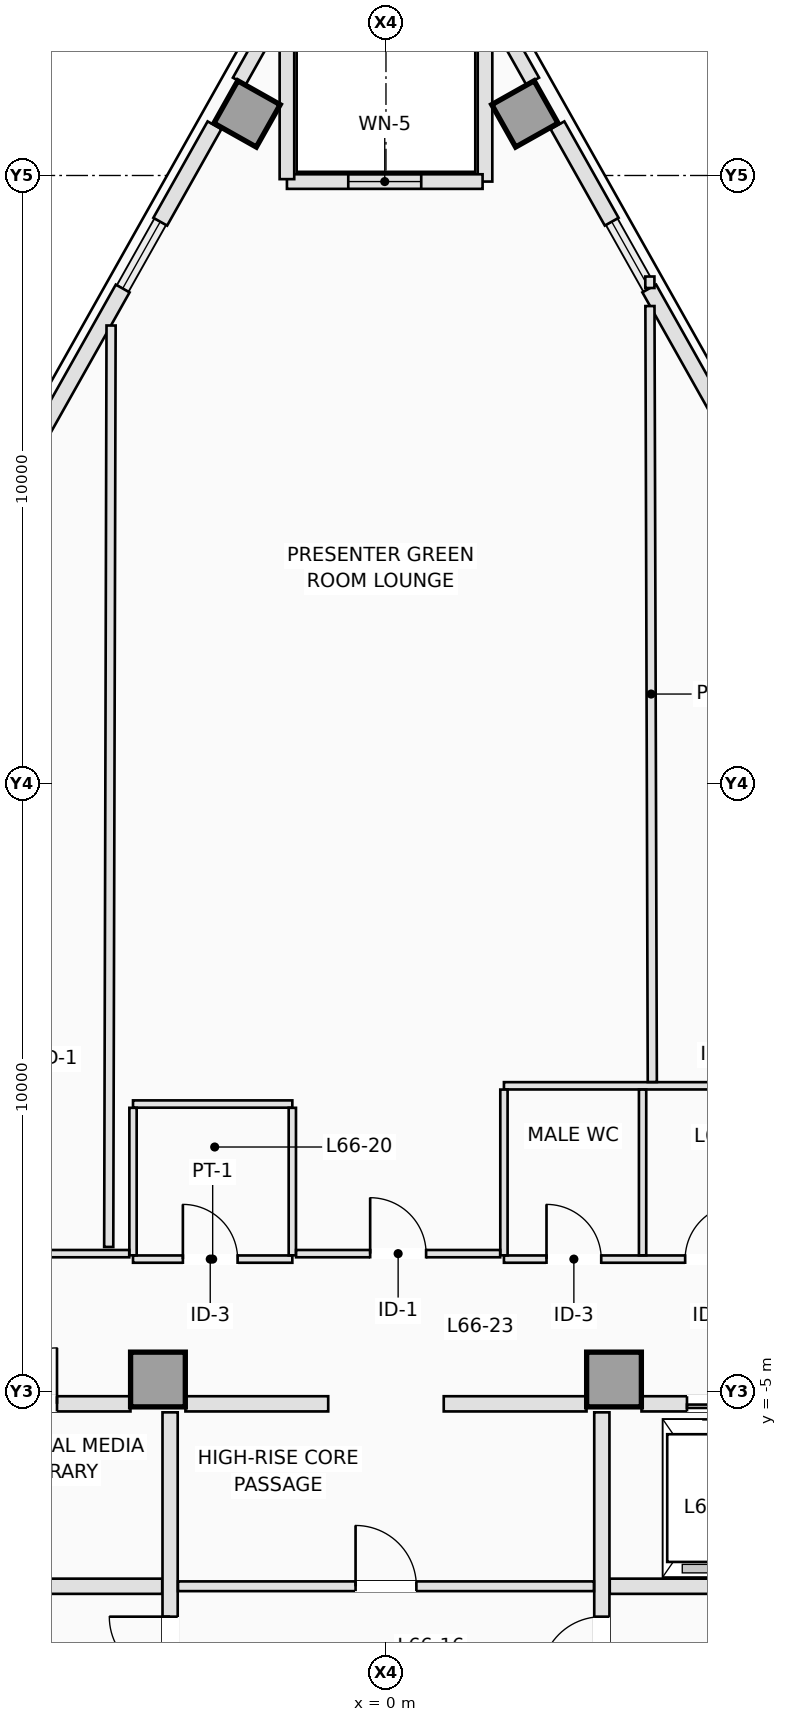
"""IFC4 building model, lengths in metres.
Left out: names, types, materials, properties, quantities, classifications, styles, units other than length and angle.
Written with IfcOpenShell. Run it as: python <this file> out.ifc"""

import sys

from ifc_helpers import new_model, si_unit, direction, frame, frame_2d, origin, origin_2d, place, context, subcontext, project, spatial, rectangle, extrude, element, fill, save


model = new_model("IFC4")
c1 = context("Model", 3, precision=1e-05, world=origin(), true_north=direction((0.0, 1.0)))
c2 = subcontext(c1, "Body", "Model", "MODEL_VIEW")
j1 = project(units=[si_unit("LENGTHUNIT", "METRE"), si_unit("PLANEANGLEUNIT", "RADIAN")], contexts=[c1])
p1 = place(None, origin())
s1 = spatial("IfcSite", under=j1, at=p1, CompositionType="ELEMENT")
p2 = place(p1, origin())
s2 = spatial("IfcBuilding", under=s1, at=p2, CompositionType="ELEMENT")
p3 = place(p2, frame((0.0, 0.0, 239.4)))
s3 = spatial("IfcBuildingStorey", under=s2, at=p3, CompositionType="ELEMENT", Elevation=239.4)
for number, where, z_axis, x_axis in (
    (1, (-3.75, -4.8, 0.0), (0.0, 0.0, 1.0), (1.0, 0.0, 0.0)),
    (2, (3.75, -4.8, 0.0), (0.0, 0.0, 1.0), (1.0, 0.0, 0.0)),
):
    element("IfcColumn", number, at=place(p3, frame(where, z_axis=z_axis, x_axis=x_axis)), inside=s3, PredefinedType="COLUMN", context=c2, shape_type="SweptSolid", body=[
        extrude(rectangle(XDim=0.9, YDim=0.9, at=origin_2d()), origin(), (0.0, 0.0, 1.0), 3.5),
    ])
for number, where, z_axis, x_axis in (
    (3, (2.285, 16.012, 0.0), (0.0, 0.0, 1.0), (0.872, 0.49, 0.0)),
    (4, (-2.285, 16.012, 0.0), (0.0, 0.0, 1.0), (-0.872, 0.49, 0.0)),
):
    element("IfcColumn", number, at=place(p3, frame(where, z_axis=z_axis, x_axis=x_axis)), inside=s3, PredefinedType="COLUMN", context=c2, shape_type="SweptSolid", body=[
        extrude(rectangle(XDim=0.8, YDim=0.8, at=origin_2d()), origin(), (0.0, 0.0, 1.0), 3.5),
    ])
p4 = place(p3, frame((1.95, 17.373, 0.0), z_axis=(0.0, 0.0, 1.0), x_axis=(0.490199895283, -0.871610040479, 0.0)))
e5 = element("IfcWall", 5, at=p4, inside=s3, PredefinedType="STANDARD", context=c2, shape_type="SweptSolid", body=[
    extrude(rectangle(XDim=0.945, YDim=0.24, at=frame_2d((0.472, 0.0))), origin(), (0.0, 0.0, 1.0), 3.25),
])
p5 = place(p3, frame((2.82, 15.826, 0.0), z_axis=(0.0, 0.0, 1.0), x_axis=(0.490261239633, -0.871575537125, 0.0)))
e6 = element("IfcWall", 6, at=p5, inside=s3, PredefinedType="STANDARD", context=c2, shape_type="SweptSolid", body=[
    extrude(rectangle(XDim=1.82, YDim=0.26, at=frame_2d((0.91, 0.0))), origin(), (0.0, 0.0, 1.0), 3.25),
])
p6 = place(p3, frame((4.33, 13.142, 0.0), z_axis=(0.0, 0.0, 1.0), x_axis=(0.490265525523, -0.871573126297, 0.0)))
e7 = element("IfcWall", 7, at=p6, inside=s3, PredefinedType="STANDARD", context=c2, shape_type="SweptSolid", body=[
    extrude(rectangle(XDim=5.409, YDim=0.26, at=frame_2d((2.705, 0.0))), origin(), (0.0, 0.0, 1.0), 3.25),
])
p7 = place(p3, frame((-2.413, 16.549, 0.0), z_axis=(0.0, 0.0, 1.0), x_axis=(0.490199895283, 0.871610040479, 0.0)))
e8 = element("IfcWall", 8, at=p7, inside=s3, PredefinedType="STANDARD", context=c2, shape_type="SweptSolid", body=[
    extrude(rectangle(XDim=0.945, YDim=0.24, at=frame_2d((0.472, 0.0))), origin(), (0.0, 0.0, 1.0), 3.25),
])
p8 = place(p3, frame((-6.982, 8.427, 0.0), z_axis=(0.0, 0.0, 1.0), x_axis=(0.490265525523, 0.871573126297, 0.0)))
e9 = element("IfcWall", 9, at=p8, inside=s3, PredefinedType="STANDARD", context=c2, shape_type="SweptSolid", body=[
    extrude(rectangle(XDim=5.409, YDim=0.26, at=frame_2d((2.705, 0.0))), origin(), (0.0, 0.0, 1.0), 3.25),
])
p9 = place(p3, frame((-3.712, 14.24, 0.0), z_axis=(0.0, 0.0, 1.0), x_axis=(0.490261239633, 0.871575537125, 0.0)))
e10 = element("IfcWall", 10, at=p9, inside=s3, PredefinedType="STANDARD", context=c2, shape_type="SweptSolid", body=[
    extrude(rectangle(XDim=1.82, YDim=0.26, at=frame_2d((0.91, 0.0))), origin(), (0.0, 0.0, 1.0), 3.25),
])
p10 = place(p3, frame((1.629, 17.4, 0.0), z_axis=(0.0, 0.0, 1.0), x_axis=(0.0, -1.0, 0.0)))
e11 = element("IfcWall", 11, at=p10, inside=s3, PredefinedType="STANDARD", context=c2, shape_type="SweptSolid", body=[
    extrude(rectangle(XDim=2.5, YDim=0.24, at=frame_2d((1.25, 0.0))), origin(), (0.0, 0.0, 1.0), 3.25),
])
p11 = place(p3, frame((1.589, 14.9, 0.0), z_axis=(0.0, 0.0, 1.0), x_axis=(-1.0, 0.0, 0.0)))
e12 = element("IfcWall", 12, at=p11, inside=s3, PredefinedType="STANDARD", context=c2, shape_type="SweptSolid", body=[
    extrude(rectangle(XDim=3.218, YDim=0.24, at=frame_2d((1.609, 0.0))), origin(), (0.0, 0.0, 1.0), 3.25),
])
p12 = place(p11, frame((1.009, 0.0, 0.9)))
e13 = element("IfcOpeningElement", 13, at=p12, cuts=e12, PredefinedType="OPENING", context=c2, shape_type="SweptSolid", body=[
    extrude(rectangle(XDim=1.2, YDim=1.8, at=frame_2d((0.6, 0.9))), frame((0.0, 0.13, 0.0), z_axis=(0.0, -1.0, 0.0), x_axis=(1.0, 0.0, 0.0)), (0.0, 0.0, 1.0), 0.26),
])
p13 = place(p3, frame((-1.629, 14.94, 0.0), z_axis=(0.0, 0.0, 1.0), x_axis=(0.0, 1.0, 0.0)))
e14 = element("IfcWall", 14, at=p13, inside=s3, PredefinedType="STANDARD", context=c2, shape_type="SweptSolid", body=[
    extrude(rectangle(XDim=2.46, YDim=0.24, at=frame_2d((1.23, 0.0))), origin(), (0.0, 0.0, 1.0), 3.25),
])
for number, where, z_axis, x_axis in (
    (15, (-8.92, -8.2, 0.0), (0.0, 0.0, 1.0), (1.0, 0.0, 0.0)),
    (16, (3.68, -8.2, 0.0), (0.0, 0.0, 1.0), (1.0, 0.0, 0.0)),
):
    element("IfcWall", number, at=place(p3, frame(where, z_axis=z_axis, x_axis=x_axis)), inside=s3, PredefinedType="PARTITIONING", context=c2, shape_type="SweptSolid", body=[
        extrude(rectangle(XDim=5.24, YDim=0.25, at=frame_2d((2.62, 0.0))), origin(), (0.0, 0.0, 1.0), 3.25),
    ])
p14 = place(p3, frame((-3.55, -15.898, 0.0), z_axis=(0.0, 0.0, 1.0), x_axis=(0.0, 1.0, 0.0)))
e17 = element("IfcWall", 17, at=p14, inside=s3, PredefinedType="PARTITIONING", context=c2, shape_type="SweptSolid", body=[
    extrude(rectangle(XDim=10.558, YDim=0.25, at=frame_2d((5.279, 0.0))), origin(), (0.0, 0.0, 1.0), 3.25),
])
p15 = place(p14, frame((6.198, 0.0, 0.0)))
e18 = element("IfcOpeningElement", 18, at=p15, cuts=e17, PredefinedType="OPENING", context=c2, shape_type="SweptSolid", body=[
    extrude(rectangle(XDim=1.0, YDim=2.15, at=frame_2d((0.5, 1.075))), frame((0.0, 0.135, 0.0), z_axis=(0.0, -1.0, 0.0), x_axis=(1.0, 0.0, 0.0)), (0.0, 0.0, 1.0), 0.27),
])
p16 = place(p3, frame((3.55, -15.898, 0.0), z_axis=(0.0, 0.0, 1.0), x_axis=(0.0, 1.0, 0.0)))
e19 = element("IfcWall", 19, at=p16, inside=s3, PredefinedType="PARTITIONING", context=c2, shape_type="SweptSolid", body=[
    extrude(rectangle(XDim=10.558, YDim=0.25, at=frame_2d((5.279, 0.0))), origin(), (0.0, 0.0, 1.0), 3.25),
])
p17 = place(p16, frame((6.198, 0.0, 0.0)))
e20 = element("IfcOpeningElement", 20, at=p17, cuts=e19, PredefinedType="OPENING", context=c2, shape_type="SweptSolid", body=[
    extrude(rectangle(XDim=1.0, YDim=2.15, at=frame_2d((0.5, 1.075))), frame((0.0, 0.135, 0.0), z_axis=(0.0, -1.0, 0.0), x_axis=(1.0, 0.0, 0.0)), (0.0, 0.0, 1.0), 0.27),
])
p18 = place(p3, frame((-12.48, -5.2, 0.0), z_axis=(0.0, 0.0, 1.0), x_axis=(1.0, 0.0, 0.0)))
e21 = element("IfcWall", 21, at=p18, inside=s3, PredefinedType="PARTITIONING", context=c2, shape_type="SweptSolid", body=[
    extrude(rectangle(XDim=8.278, YDim=0.25, at=frame_2d((4.139, 0.0))), origin(), (0.0, 0.0, 1.0), 3.25),
])
p19 = place(p18, frame((3.05, 0.0, 0.0)))
e22 = element("IfcOpeningElement", 22, at=p19, cuts=e21, PredefinedType="OPENING", context=c2, shape_type="SweptSolid", body=[
    extrude(rectangle(XDim=0.92, YDim=2.12, at=frame_2d((0.46, 1.06))), frame((0.0, 0.135, 0.0), z_axis=(0.0, -1.0, 0.0), x_axis=(1.0, 0.0, 0.0)), (0.0, 0.0, 1.0), 0.27),
])
p20 = place(p18, frame((6.15, 0.0, 0.0)))
e23 = element("IfcOpeningElement", 23, at=p20, cuts=e21, PredefinedType="OPENING", context=c2, shape_type="SweptSolid", body=[
    extrude(rectangle(XDim=0.92, YDim=2.12, at=frame_2d((0.46, 1.06))), frame((0.0, 0.135, 0.0), z_axis=(0.0, -1.0, 0.0), x_axis=(1.0, 0.0, 0.0)), (0.0, 0.0, 1.0), 0.27),
])
p21 = place(p3, frame((4.202, -5.2, 0.0), z_axis=(0.0, 0.0, 1.0), x_axis=(1.0, 0.0, 0.0)))
e24 = element("IfcWall", 24, at=p21, inside=s3, PredefinedType="PARTITIONING", context=c2, shape_type="SweptSolid", body=[
    extrude(rectangle(XDim=8.278, YDim=0.25, at=frame_2d((4.139, 0.0))), origin(), (0.0, 0.0, 1.0), 3.25),
])
p22 = place(p21, frame((0.748, 0.0, 0.0)))
e25 = element("IfcOpeningElement", 25, at=p22, cuts=e24, PredefinedType="OPENING", context=c2, shape_type="SweptSolid", body=[
    extrude(rectangle(XDim=1.0, YDim=2.15, at=frame_2d((0.5, 1.075))), frame((0.0, 0.135, 0.0), z_axis=(0.0, -1.0, 0.0), x_axis=(1.0, 0.0, 0.0)), (0.0, 0.0, 1.0), 0.27),
])
p23 = place(p21, frame((2.698, 0.0, 0.0)))
e26 = element("IfcOpeningElement", 26, at=p23, cuts=e24, PredefinedType="OPENING", context=c2, shape_type="SweptSolid", body=[
    extrude(rectangle(XDim=1.0, YDim=2.15, at=frame_2d((0.5, 1.075))), frame((0.0, 0.135, 0.0), z_axis=(0.0, -1.0, 0.0), x_axis=(1.0, 0.0, 0.0)), (0.0, 0.0, 1.0), 0.27),
])
p24 = place(p21, frame((4.648, 0.0, 0.0)))
e27 = element("IfcOpeningElement", 27, at=p24, cuts=e24, PredefinedType="OPENING", context=c2, shape_type="SweptSolid", body=[
    extrude(rectangle(XDim=1.0, YDim=2.15, at=frame_2d((0.5, 1.075))), frame((0.0, 0.135, 0.0), z_axis=(0.0, -1.0, 0.0), x_axis=(1.0, 0.0, 0.0)), (0.0, 0.0, 1.0), 0.27),
])
p25 = place(p21, frame((6.598, 0.0, 0.0)))
e28 = element("IfcOpeningElement", 28, at=p25, cuts=e24, PredefinedType="OPENING", context=c2, shape_type="SweptSolid", body=[
    extrude(rectangle(XDim=1.0, YDim=2.15, at=frame_2d((0.5, 1.075))), frame((0.0, 0.135, 0.0), z_axis=(0.0, -1.0, 0.0), x_axis=(1.0, 0.0, 0.0)), (0.0, 0.0, 1.0), 0.27),
])
for number, where, z_axis, x_axis in (
    (29, (-3.298, -5.2, 0.0), (0.0, 0.0, 1.0), (1.0, 0.0, 0.0)),
    (30, (0.95, -5.2, 0.0), (0.0, 0.0, 1.0), (1.0, 0.0, 0.0)),
):
    element("IfcWall", number, at=place(p3, frame(where, z_axis=z_axis, x_axis=x_axis)), inside=s3, PredefinedType="PARTITIONING", context=c2, shape_type="SweptSolid", body=[
        extrude(rectangle(XDim=2.348, YDim=0.25, at=frame_2d((1.174, 0.0))), origin(), (0.0, 0.0, 1.0), 3.25),
    ])
p26 = place(p3, frame((-3.42, -8.2, 0.0), z_axis=(0.0, 0.0, 1.0), x_axis=(1.0, 0.0, 0.0)))
e31 = element("IfcWall", 31, at=p26, inside=s3, PredefinedType="PARTITIONING", context=c2, shape_type="SweptSolid", body=[
    extrude(rectangle(XDim=6.84, YDim=0.16, at=frame_2d((3.42, 0.0))), origin(), (0.0, 0.0, 1.0), 3.25),
])
p27 = place(p26, frame((2.92, 0.0, 0.0)))
e32 = element("IfcOpeningElement", 32, at=p27, cuts=e31, PredefinedType="OPENING", context=c2, shape_type="SweptSolid", body=[
    extrude(rectangle(XDim=1.0, YDim=2.15, at=frame_2d((0.5, 1.075))), frame((0.0, 0.09, 0.0), z_axis=(0.0, -1.0, 0.0), x_axis=(1.0, 0.0, 0.0)), (0.0, 0.0, 1.0), 0.18),
])
p28 = place(p3, frame((-4.16, -2.82, 0.0), z_axis=(0.0, 0.0, 1.0), x_axis=(1.0, 0.0, 0.0)))
e33 = element("IfcWall", 33, at=p28, inside=s3, PredefinedType="PARTITIONING", context=c2, shape_type="SweptSolid", body=[
    extrude(rectangle(XDim=2.62, YDim=0.12, at=frame_2d((1.31, 0.0))), origin(), (0.0, 0.0, 1.0), 2.943),
])
p29 = place(p28, frame((0.82, 0.0, 0.0)))
e34 = element("IfcOpeningElement", 34, at=p29, cuts=e33, PredefinedType="OPENING", context=c2, shape_type="SweptSolid", body=[
    extrude(rectangle(XDim=0.9, YDim=2.12, at=frame_2d((0.45, 1.06))), frame((0.0, 0.07, 0.0), z_axis=(0.0, -1.0, 0.0), x_axis=(1.0, 0.0, 0.0)), (0.0, 0.0, 1.0), 0.14),
])
p30 = place(p3, frame((-4.16, -0.27, 0.0), z_axis=(0.0, 0.0, 1.0), x_axis=(1.0, 0.0, 0.0)))
e35 = element("IfcWall", 35, at=p30, inside=s3, PredefinedType="PARTITIONING", context=c2, shape_type="SweptSolid", body=[
    extrude(rectangle(XDim=2.62, YDim=0.12, at=frame_2d((1.31, 0.0))), origin(), (0.0, 0.0, 1.0), 3.25),
])
for number, where, z_axis, x_axis in (
    (36, (-4.16, -2.758, 0.0), (0.0, 0.0, 1.0), (0.0, 1.0, 0.0)),
    (37, (-1.54, -2.758, 0.0), (0.0, 0.0, 1.0), (0.0, 1.0, 0.0)),
):
    element("IfcWall", number, at=place(p3, frame(where, z_axis=z_axis, x_axis=x_axis)), inside=s3, PredefinedType="PARTITIONING", context=c2, shape_type="SweptSolid", body=[
        extrude(rectangle(XDim=2.426, YDim=0.12, at=frame_2d((1.213, 0.0))), origin(), (0.0, 0.0, 1.0), 3.25),
    ])
p31 = place(p3, frame((1.94, -2.82, 0.0), z_axis=(0.0, 0.0, 1.0), x_axis=(1.0, 0.0, 0.0)))
e38 = element("IfcWall", 38, at=p31, inside=s3, PredefinedType="PARTITIONING", context=c2, shape_type="SweptSolid", body=[
    extrude(rectangle(XDim=4.57, YDim=0.12, at=frame_2d((2.285, 0.0))), origin(), (0.0, 0.0, 1.0), 2.943),
])
p32 = place(p31, frame((0.7, 0.0, 0.0)))
e39 = element("IfcOpeningElement", 39, at=p32, cuts=e38, PredefinedType="OPENING", context=c2, shape_type="SweptSolid", body=[
    extrude(rectangle(XDim=0.9, YDim=2.12, at=frame_2d((0.45, 1.06))), frame((0.0, 0.07, 0.0), z_axis=(0.0, -1.0, 0.0), x_axis=(1.0, 0.0, 0.0)), (0.0, 0.0, 1.0), 0.14),
])
p33 = place(p31, frame((2.98, 0.0, 0.0)))
e40 = element("IfcOpeningElement", 40, at=p33, cuts=e38, PredefinedType="OPENING", context=c2, shape_type="SweptSolid", body=[
    extrude(rectangle(XDim=0.9, YDim=2.12, at=frame_2d((0.45, 1.06))), frame((0.0, 0.07, 0.0), z_axis=(0.0, -1.0, 0.0), x_axis=(1.0, 0.0, 0.0)), (0.0, 0.0, 1.0), 0.14),
])
p34 = place(p3, frame((1.94, 0.03, 0.0), z_axis=(0.0, 0.0, 1.0), x_axis=(1.0, 0.0, 0.0)))
e41 = element("IfcWall", 41, at=p34, inside=s3, PredefinedType="PARTITIONING", context=c2, shape_type="SweptSolid", body=[
    extrude(rectangle(XDim=4.57, YDim=0.12, at=frame_2d((2.285, 0.0))), origin(), (0.0, 0.0, 1.0), 3.25),
])
for number, where, z_axis, x_axis in (
    (42, (1.94, -2.758, 0.0), (0.0, 0.0, 1.0), (0.0, 1.0, 0.0)),
    (43, (4.22, -2.758, 0.0), (0.0, 0.0, 1.0), (0.0, 1.0, 0.0)),
):
    element("IfcWall", number, at=place(p3, frame(where, z_axis=z_axis, x_axis=x_axis)), inside=s3, PredefinedType="PARTITIONING", context=c2, shape_type="SweptSolid", body=[
        extrude(rectangle(XDim=2.726, YDim=0.12, at=frame_2d((1.363, 0.0))), origin(), (0.0, 0.0, 1.0), 3.25),
    ])
p35 = place(p3, frame((-7.088, -2.73, 0.0), z_axis=(0.0, 0.0, 1.0), x_axis=(1.0, 0.0, 0.0)))
e44 = element("IfcWall", 44, at=p35, inside=s3, PredefinedType="PARTITIONING", context=c2, shape_type="SweptSolid", body=[
    extrude(rectangle(XDim=2.866, YDim=0.12, at=frame_2d((1.433, 0.0))), origin(), (0.0, 0.0, 1.0), 3.25),
])
p36 = place(p3, frame((-1.478, -2.73, 0.0), z_axis=(0.0, 0.0, 1.0), x_axis=(1.0, 0.0, 0.0)))
e45 = element("IfcWall", 45, at=p36, inside=s3, PredefinedType="PARTITIONING", context=c2, shape_type="SweptSolid", body=[
    extrude(rectangle(XDim=3.356, YDim=0.12, at=frame_2d((1.678, 0.0))), origin(), (0.0, 0.0, 1.0), 2.943),
])
p37 = place(p36, frame((1.218, 0.0, 0.0)))
e46 = element("IfcOpeningElement", 46, at=p37, cuts=e45, PredefinedType="OPENING", context=c2, shape_type="SweptSolid", body=[
    extrude(rectangle(XDim=0.92, YDim=2.12, at=frame_2d((0.46, 1.06))), frame((0.0, 0.07, 0.0), z_axis=(0.0, -1.0, 0.0), x_axis=(1.0, 0.0, 0.0)), (0.0, 0.0, 1.0), 0.14),
])
p38 = place(p3, frame((4.339, 13.339, 0.0), z_axis=(0.0, 0.0, 1.0), x_axis=(0.003875939878, -0.999992488517, 0.0)))
e47 = element("IfcWall", 47, at=p38, inside=s3, PredefinedType="PARTITIONING", context=c2, shape_type="SweptSolid", body=[
    extrude(rectangle(XDim=0.189, YDim=0.15, at=frame_2d((0.094, 0.0))), origin(), (0.0, 0.0, 1.0), 3.25),
])
p39 = place(p3, frame((4.341, 12.853, 0.0), z_axis=(0.0, 0.0, 1.0), x_axis=(0.003061132057, -0.999995314724, 0.0)))
e48 = element("IfcWall", 48, at=p39, inside=s3, PredefinedType="PARTITIONING", context=c2, shape_type="SweptSolid", body=[
    extrude(rectangle(XDim=12.761, YDim=0.15, at=frame_2d((6.38, 0.0))), origin(), (0.0, 0.0, 1.0), 3.25),
])
p40 = place(p3, frame((-4.56, -2.62, 0.0), z_axis=(0.0, 0.0, 1.0), x_axis=(0.002561739383, 0.99999671874, 0.0)))
e49 = element("IfcWall", 49, at=p40, inside=s3, PredefinedType="PARTITIONING", context=c2, shape_type="SweptSolid", body=[
    extrude(rectangle(XDim=15.153, YDim=0.15, at=frame_2d((7.577, 0.0))), origin(), (0.0, 0.0, 1.0), 3.25),
])
p41 = place(p12, origin())
e50 = element("IfcWindow", 50, at=p41, inside=s3, PartitioningType="SINGLE_PANEL", PredefinedType="WINDOW", context=c2, shape_type="SweptSolid", body=[
    extrude(rectangle(XDim=1.2, YDim=1.8, at=frame_2d((0.6, 0.9))), frame((0.0, 0.03, 0.0), z_axis=(0.0, -1.0, 0.0), x_axis=(1.0, 0.0, 0.0)), (0.0, 0.0, 1.0), 0.06),
])
fill(e13, e50)
p42 = place(p22, origin())
e51 = element("IfcDoor", 51, at=p42, inside=s3, OperationType="SLIDING_TO_RIGHT", PredefinedType="DOOR", context=c2, shape_type="SweptSolid", body=[
    extrude(rectangle(XDim=1.0, YDim=2.15, at=frame_2d((0.5, 1.075))), frame((0.0, 0.025, 0.0), z_axis=(0.0, -1.0, 0.0), x_axis=(1.0, 0.0, 0.0)), (0.0, 0.0, 1.0), 0.05),
])
fill(e25, e51)
p43 = place(p15, origin())
e52 = element("IfcDoor", 52, at=p43, inside=s3, OperationType="SINGLE_SWING_RIGHT", PredefinedType="DOOR", context=c2, shape_type="SweptSolid", body=[
    extrude(rectangle(XDim=1.0, YDim=2.15, at=frame_2d((0.5, 1.075))), frame((0.0, 0.025, 0.0), z_axis=(0.0, -1.0, 0.0), x_axis=(1.0, 0.0, 0.0)), (0.0, 0.0, 1.0), 0.05),
])
fill(e18, e52)
p44 = place(p17, origin())
e53 = element("IfcDoor", 53, at=p44, inside=s3, OperationType="SINGLE_SWING_LEFT", PredefinedType="DOOR", context=c2, shape_type="SweptSolid", body=[
    extrude(rectangle(XDim=1.0, YDim=2.15, at=frame_2d((0.5, 1.075))), frame((0.0, 0.025, 0.0), z_axis=(0.0, -1.0, 0.0), x_axis=(1.0, 0.0, 0.0)), (0.0, 0.0, 1.0), 0.05),
])
fill(e20, e53)
p45 = place(p20, origin())
e54 = element("IfcDoor", 54, at=p45, inside=s3, OperationType="SINGLE_SWING_RIGHT", PredefinedType="DOOR", context=c2, shape_type="SweptSolid", body=[
    extrude(rectangle(XDim=0.92, YDim=2.12, at=frame_2d((0.46, 1.06))), frame((0.0, 0.025, 0.0), z_axis=(0.0, -1.0, 0.0), x_axis=(1.0, 0.0, 0.0)), (0.0, 0.0, 1.0), 0.05),
])
fill(e23, e54)
p46 = place(p27, origin())
e55 = element("IfcDoor", 55, at=p46, inside=s3, OperationType="SINGLE_SWING_LEFT", PredefinedType="DOOR", context=c2, shape_type="SweptSolid", body=[
    extrude(rectangle(XDim=1.0, YDim=2.15, at=frame_2d((0.5, 1.075))), frame((0.0, 0.025, 0.0), z_axis=(0.0, -1.0, 0.0), x_axis=(1.0, 0.0, 0.0)), (0.0, 0.0, 1.0), 0.05),
])
fill(e32, e55)
p47 = place(p29, origin())
e56 = element("IfcDoor", 56, at=p47, inside=s3, OperationType="SINGLE_SWING_LEFT", PredefinedType="DOOR", context=c2, shape_type="SweptSolid", body=[
    extrude(rectangle(XDim=0.9, YDim=2.12, at=frame_2d((0.45, 1.06))), frame((0.0, 0.025, 0.0), z_axis=(0.0, -1.0, 0.0), x_axis=(1.0, 0.0, 0.0)), (0.0, 0.0, 1.0), 0.05),
])
fill(e34, e56)
p48 = place(p32, origin())
e57 = element("IfcDoor", 57, at=p48, inside=s3, OperationType="SINGLE_SWING_LEFT", PredefinedType="DOOR", context=c2, shape_type="SweptSolid", body=[
    extrude(rectangle(XDim=0.9, YDim=2.12, at=frame_2d((0.45, 1.06))), frame((0.0, 0.025, 0.0), z_axis=(0.0, -1.0, 0.0), x_axis=(1.0, 0.0, 0.0)), (0.0, 0.0, 1.0), 0.05),
])
fill(e39, e57)
p49 = place(p33, origin())
e58 = element("IfcDoor", 58, at=p49, inside=s3, OperationType="SINGLE_SWING_RIGHT", PredefinedType="DOOR", context=c2, shape_type="SweptSolid", body=[
    extrude(rectangle(XDim=0.9, YDim=2.12, at=frame_2d((0.45, 1.06))), frame((0.0, 0.025, 0.0), z_axis=(0.0, -1.0, 0.0), x_axis=(1.0, 0.0, 0.0)), (0.0, 0.0, 1.0), 0.05),
])
fill(e40, e58)
p50 = place(p37, origin())
e59 = element("IfcDoor", 59, at=p50, inside=s3, OperationType="SINGLE_SWING_LEFT", PredefinedType="DOOR", context=c2, shape_type="SweptSolid", body=[
    extrude(rectangle(XDim=0.92, YDim=2.12, at=frame_2d((0.46, 1.06))), frame((0.0, 0.025, 0.0), z_axis=(0.0, -1.0, 0.0), x_axis=(1.0, 0.0, 0.0)), (0.0, 0.0, 1.0), 0.05),
])
fill(e46, e59)
save(model, sys.argv[1])
